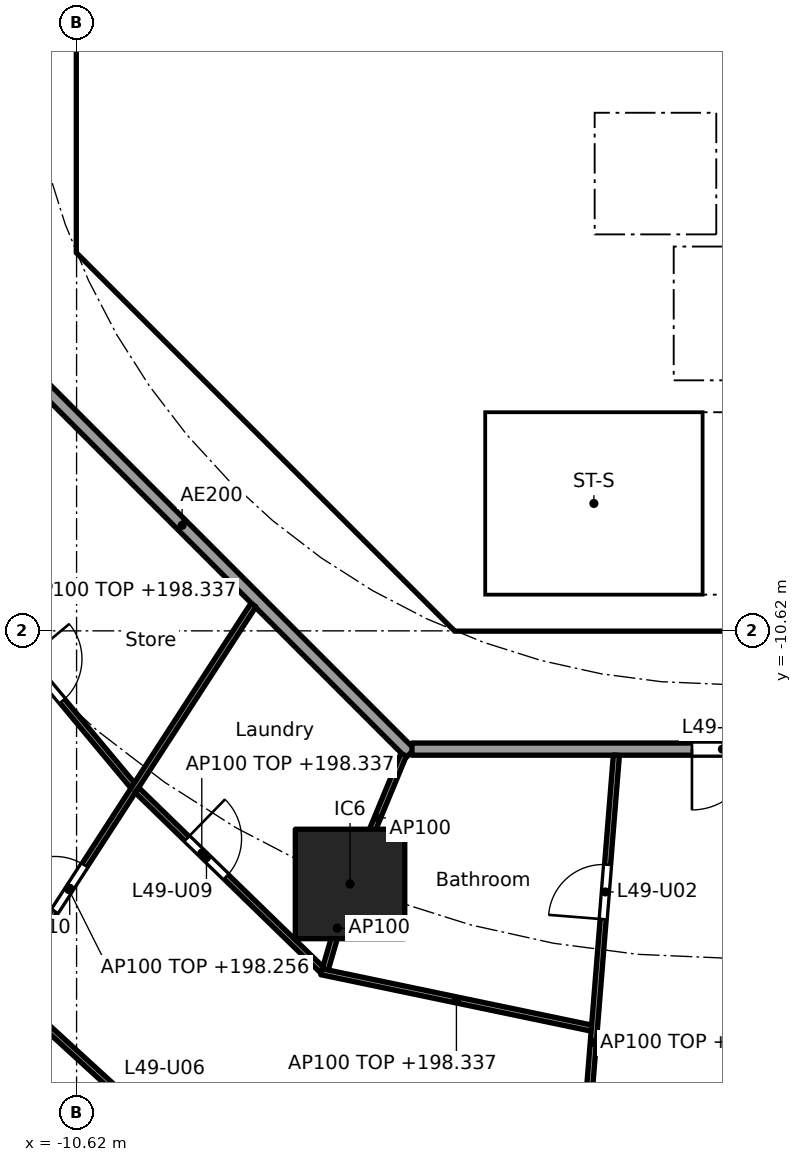
"""IFC4 building model, lengths in metres.
Left out: names, types, materials, properties, quantities, classifications, styles, units other than length and angle.
Written with IfcOpenShell. Run it as: python <this file> out.ifc"""

import sys

from ifc_helpers import new_model, si_unit, direction, frame, frame_2d, origin, origin_2d, place, context, subcontext, project, spatial, polyline, rectangle, outline, extrude, element, fill, save


model = new_model("IFC4")
c1 = context("Model", 3, precision=1e-05, world=origin(), true_north=direction((0.0, 1.0)))
c2 = subcontext(c1, "Body", "Model", "MODEL_VIEW")
j1 = project(units=[si_unit("LENGTHUNIT", "METRE"), si_unit("PLANEANGLEUNIT", "RADIAN")], contexts=[c1])
p1 = place(None, origin())
s1 = spatial("IfcSite", under=j1, at=p1, CompositionType="ELEMENT")
p2 = place(p1, origin())
s2 = spatial("IfcBuilding", under=s1, at=p2, CompositionType="ELEMENT")
p3 = place(p2, frame((0.0, 0.0, 195.5)))
s3 = spatial("IfcBuildingStorey", under=s2, at=p3, CompositionType="ELEMENT", Elevation=195.5)
p4 = place(p3, frame((-6.123, -14.782, 0.0), z_axis=(0.0, 0.0, 1.0), x_axis=(1.0, 0.0, 0.0)))
e1 = element("IfcColumn", 1, at=p4, inside=s3, PredefinedType="COLUMN", context=c2, shape_type="SweptSolid", body=[
    extrude(rectangle(XDim=1.8, YDim=1.8, at=origin_2d()), origin(), (0.0, 0.0, 1.0), 3.7),
])
p5 = place(p3, frame((-10.325, 3.801, 0.0), z_axis=(0.0, 0.0, 1.0), x_axis=(0.0, -1.0, 0.0)))
e2 = element("IfcWall", 2, at=p5, inside=s3, PredefinedType="SHEAR", context=c2, shape_type="SweptSolid", body=[
    extrude(rectangle(XDim=7.602, YDim=0.6, at=frame_2d((3.801, 0.0))), origin(), (0.0, 0.0, 1.0), 3.44),
])
p6 = place(p5, frame((0.651, 0.0, 0.0)))
e3 = element("IfcOpeningElement", 3, at=p6, cuts=e2, PredefinedType="OPENING", context=c2, shape_type="SweptSolid", body=[
    extrude(rectangle(XDim=1.5, YDim=2.1, at=frame_2d((0.75, 1.05))), frame((0.0, 0.31, 0.0), z_axis=(0.0, -1.0, 0.0), x_axis=(1.0, 0.0, 0.0)), (0.0, 0.0, 1.0), 0.62),
])
p7 = place(p5, frame((5.451, 0.0, 0.0)))
e4 = element("IfcOpeningElement", 4, at=p7, cuts=e2, PredefinedType="OPENING", context=c2, shape_type="SweptSolid", body=[
    extrude(rectangle(XDim=1.5, YDim=2.1, at=frame_2d((0.75, 1.05))), frame((0.0, 0.31, 0.0), z_axis=(0.0, -1.0, 0.0), x_axis=(1.0, 0.0, 0.0)), (0.0, 0.0, 1.0), 0.62),
])
p8 = place(p3, frame((-9.988, -4.613, 0.0), z_axis=(0.0, 0.0, 1.0), x_axis=(0.707106781187, -0.707106781187, 0.0)))
e5 = element("IfcWall", 5, at=p8, inside=s3, PredefinedType="SHEAR", context=c2, shape_type="SweptSolid", body=[
    extrude(rectangle(XDim=7.602, YDim=0.6, at=frame_2d((3.801, 0.0))), origin(), (0.0, 0.0, 1.0), 3.44),
])
p9 = place(p8, frame((6.151, 0.0, 0.0)))
e6 = element("IfcOpeningElement", 6, at=p9, cuts=e5, PredefinedType="OPENING", context=c2, shape_type="SweptSolid", body=[
    extrude(rectangle(XDim=1.1, YDim=2.1, at=frame_2d((0.55, 1.05))), frame((0.0, 0.31, 0.0), z_axis=(0.0, -1.0, 0.0), x_axis=(1.0, 0.0, 0.0)), (0.0, 0.0, 1.0), 0.62),
])
p10 = place(p3, frame((-6.2, -7.827, 0.0), z_axis=(0.0, 0.0, 1.0), x_axis=(0.0, 1.0, 0.0)))
e7 = element("IfcWall", 7, at=p10, inside=s3, PredefinedType="PARTITIONING", context=c2, shape_type="SweptSolid", body=[
    extrude(rectangle(XDim=3.527, YDim=0.15, at=frame_2d((1.763, 0.0))), origin(), (0.0, 0.0, 1.0), 3.44),
])
p11 = place(p10, frame((2.365, 0.0, 0.0)))
e8 = element("IfcOpeningElement", 8, at=p11, cuts=e7, PredefinedType="OPENING", context=c2, shape_type="SweptSolid", body=[
    extrude(rectangle(XDim=0.9, YDim=2.1, at=frame_2d((0.45, 1.05))), frame((0.0, 0.085, 0.0), z_axis=(0.0, -1.0, 0.0), x_axis=(1.0, 0.0, 0.0)), (0.0, 0.0, 1.0), 0.17),
])
p12 = place(p10, frame((0.489, 0.0, 0.0)))
e9 = element("IfcOpeningElement", 9, at=p12, cuts=e7, PredefinedType="OPENING", context=c2, shape_type="SweptSolid", body=[
    extrude(rectangle(XDim=0.9, YDim=2.1, at=frame_2d((0.45, 1.05))), frame((0.0, 0.085, 0.0), z_axis=(0.0, -1.0, 0.0), x_axis=(1.0, 0.0, 0.0)), (0.0, 0.0, 1.0), 0.17),
])
p13 = place(p3, frame((-4.0, -6.5, 0.0), z_axis=(0.0, 0.0, 1.0), x_axis=(0.0, 1.0, 0.0)))
e10 = element("IfcWall", 10, at=p13, inside=s3, PredefinedType="SOLIDWALL", context=c2, shape_type="SweptSolid", body=[
    extrude(rectangle(XDim=2.2, YDim=0.2, at=frame_2d((1.1, 0.0))), origin(), (0.0, 0.0, 1.0), 3.44),
])
p14 = place(p13, frame((0.65, 0.0, 0.0)))
e11 = element("IfcOpeningElement", 11, at=p14, cuts=e10, PredefinedType="OPENING", context=c2, shape_type="SweptSolid", body=[
    extrude(rectangle(XDim=0.9, YDim=2.1, at=frame_2d((0.45, 1.05))), frame((0.0, 0.11, 0.0), z_axis=(0.0, -1.0, 0.0), x_axis=(1.0, 0.0, 0.0)), (0.0, 0.0, 1.0), 0.22),
])
p15 = place(p3, frame((-6.7, -2.0, 0.0), z_axis=(0.0, 0.0, 1.0), x_axis=(1.0, 0.0, 0.0)))
e12 = element("IfcWall", 12, at=p15, inside=s3, PredefinedType="SOLIDWALL", context=c2, shape_type="SweptSolid", body=[
    extrude(rectangle(XDim=13.4, YDim=0.2, at=frame_2d((6.7, 0.0))), origin(), (0.0, 0.0, 1.0), 3.44),
])
p16 = place(p15, frame((5.05, 0.0, 0.0)))
e13 = element("IfcOpeningElement", 13, at=p16, cuts=e12, PredefinedType="OPENING", context=c2, shape_type="SweptSolid", body=[
    extrude(rectangle(XDim=1.1, YDim=2.1, at=frame_2d((0.55, 1.05))), frame((0.0, 0.11, 0.0), z_axis=(0.0, -1.0, 0.0), x_axis=(1.0, 0.0, 0.0)), (0.0, 0.0, 1.0), 0.22),
])
p17 = place(p15, frame((7.25, 0.0, 0.0)))
e14 = element("IfcOpeningElement", 14, at=p17, cuts=e12, PredefinedType="OPENING", context=c2, shape_type="SweptSolid", body=[
    extrude(rectangle(XDim=1.1, YDim=2.1, at=frame_2d((0.55, 1.05))), frame((0.0, 0.11, 0.0), z_axis=(0.0, -1.0, 0.0), x_axis=(1.0, 0.0, 0.0)), (0.0, 0.0, 1.0), 0.22),
])
p18 = place(p15, frame((0.75, 0.0, 0.0)))
e15 = element("IfcOpeningElement", 15, at=p18, cuts=e12, PredefinedType="OPENING", context=c2, shape_type="SweptSolid", body=[
    extrude(rectangle(XDim=0.9, YDim=2.1, at=frame_2d((0.45, 1.05))), frame((0.0, 0.11, 0.0), z_axis=(0.0, -1.0, 0.0), x_axis=(1.0, 0.0, 0.0)), (0.0, 0.0, 1.0), 0.22),
])
p19 = place(p15, frame((2.95, 0.0, 0.0)))
e16 = element("IfcOpeningElement", 16, at=p19, cuts=e12, PredefinedType="OPENING", context=c2, shape_type="SweptSolid", body=[
    extrude(rectangle(XDim=0.9, YDim=2.1, at=frame_2d((0.45, 1.05))), frame((0.0, 0.11, 0.0), z_axis=(0.0, -1.0, 0.0), x_axis=(1.0, 0.0, 0.0)), (0.0, 0.0, 1.0), 0.22),
])
p20 = place(p3, origin())
e17 = element("IfcWall", 17, at=p20, inside=s3, PredefinedType="SHEAR", context=c2, shape_type="SweptSolid", body=[
    extrude(outline(polyline([(-10.625, -3.801), (-10.025, -3.801), (-10.025, -4.152), (-9.776, -4.401), (-10.2, -4.825), (-10.625, -4.401), (-10.625, -3.801)])), origin(), (0.0, 0.0, 1.0), 3.44),
])
p21 = place(p3, origin())
e18 = element("IfcWall", 18, at=p21, inside=s3, PredefinedType="SHEAR", context=c2, shape_type="SweptSolid", body=[
    extrude(outline(polyline([(-4.152, -10.025), (4.152, -10.025), (4.401, -9.776), (4.825, -10.2), (4.401, -10.625), (-4.401, -10.625), (-4.825, -10.2), (-4.401, -9.776), (-4.152, -10.025)])), origin(), (0.0, 0.0, 1.0), 3.44),
])
p22 = place(p3, frame((-0.9, -6.5, 0.0), z_axis=(0.0, 0.0, 1.0), x_axis=(0.0, 1.0, 0.0)))
e19 = element("IfcWall", 19, at=p22, inside=s3, PredefinedType="SOLIDWALL", context=c2, shape_type="SweptSolid", body=[
    extrude(rectangle(XDim=2.2, YDim=0.2, at=frame_2d((1.1, 0.0))), origin(), (0.0, 0.0, 1.0), 3.44),
])
p23 = place(p3, origin())
e20 = element("IfcWall", 20, at=p23, inside=s3, PredefinedType="SOLIDWALL", context=c2, shape_type="SweptSolid", body=[
    extrude(outline(polyline([(-6.7, -2.1), (-6.5, -2.1), (-6.5, -4.1), (-4.5, -4.1), (-4.5, -2.1), (-4.3, -2.1), (-4.3, -4.1), (-2.3, -4.1), (-2.3, -2.1), (-2.1, -2.1), (-2.1, -4.1), (-0.1, -4.1), (-0.1, -2.1), (0.1, -2.1), (0.1, -4.1), (2.1, -4.1), (2.1, -2.1), (2.3, -2.1), (2.3, -4.1), (4.3, -4.1), (4.3, -2.1), (4.5, -2.1), (4.5, -4.1), (6.5, -4.1), (6.5, -2.1), (6.7, -2.1), (6.7, -4.3), (-6.7, -4.3), (-6.7, -2.1)])), origin(), (0.0, 0.0, 1.0), 3.44),
])
p24 = place(p3, frame((-10.025, -4.0, 0.0), z_axis=(0.0, 0.0, 1.0), x_axis=(1.0, 0.0, 0.0)))
e21 = element("IfcWall", 21, at=p24, inside=s3, PredefinedType="PARTITIONING", context=c2, shape_type="SweptSolid", body=[
    extrude(rectangle(XDim=3.325, YDim=0.2, at=frame_2d((1.662, 0.0))), origin(), (0.0, 0.0, 1.0), 3.44),
])
p25 = place(p3, frame((-8.301, -5.8, 0.0), z_axis=(0.0, 0.0, 1.0), x_axis=(1.0, 0.0, 0.0)))
e22 = element("IfcWall", 22, at=p25, inside=s3, PredefinedType="PARTITIONING", context=c2, shape_type="SweptSolid", body=[
    extrude(rectangle(XDim=2.026, YDim=0.15, at=frame_2d((1.013, 0.0))), origin(), (0.0, 0.0, 1.0), 3.44),
])
p26 = place(p3, origin())
e23 = element("IfcWall", 23, at=p26, inside=s3, PredefinedType="SOLIDWALL", context=c2, shape_type="SweptSolid", body=[
    extrude(outline(polyline([(-3.9, -10.025), (-4.1, -10.025), (-4.1, -7.025), (-3.9, -7.025), (-3.9, -10.025)])), origin(), (0.0, 0.0, 1.0), 3.44),
])
p27 = place(p3, origin())
e24 = element("IfcWall", 24, at=p27, inside=s3, PredefinedType="SOLIDWALL", context=c2, shape_type="SweptSolid", body=[
    extrude(outline(polyline([(4.1, -7.025), (-4.1, -7.025), (-4.1, -6.5), (4.1, -6.5), (4.1, -7.025)])), origin(), (0.0, 0.0, 1.0), 3.44),
])
p28 = place(p3, frame((-12.635, -5.134, 0.0), z_axis=(0.0, 0.0, 1.0), x_axis=(0.707106781187, -0.707106781187, 0.0)))
e25 = element("IfcWall", 25, at=p28, inside=s3, PredefinedType="PARTITIONING", context=c2, shape_type="SweptSolid", body=[
    extrude(rectangle(XDim=10.609, YDim=0.2, at=frame_2d((5.305, 0.0))), origin(), (0.0, 0.0, 1.0), 3.44),
])
p29 = place(p3, frame((-5.104, -12.565, 0.0), z_axis=(0.0, 0.0, 1.0), x_axis=(1.0, 0.0, 0.0)))
e26 = element("IfcWall", 26, at=p29, inside=s3, PredefinedType="PARTITIONING", context=c2, shape_type="SweptSolid", body=[
    extrude(rectangle(XDim=10.409, YDim=0.2, at=frame_2d((5.205, 0.0))), origin(), (0.0, 0.0, 1.0), 3.44),
])
p30 = place(p29, frame((4.604, 0.0, 0.0)))
e27 = element("IfcOpeningElement", 27, at=p30, cuts=e26, PredefinedType="OPENING", context=c2, shape_type="SweptSolid", body=[
    extrude(rectangle(XDim=1.0, YDim=2.1, at=frame_2d((0.5, 1.05))), frame((0.0, 0.11, 0.0), z_axis=(0.0, -1.0, 0.0), x_axis=(1.0, 0.0, 0.0)), (0.0, 0.0, 1.0), 0.22),
])
p31 = place(p3, frame((-12.623, -9.653, 0.0), z_axis=(0.0, 0.0, 1.0), x_axis=(0.640315711982, -0.768111833647, 0.0)))
e28 = element("IfcWall", 28, at=p31, inside=s3, PredefinedType="PARTITIONING", context=c2, shape_type="SweptSolid", body=[
    extrude(rectangle(XDim=4.572, YDim=0.1, at=frame_2d((2.286, 0.0))), origin(), (0.0, 0.0, 1.0), 2.837),
])
p32 = place(p31, frame((1.861, 0.0, 0.0)))
e29 = element("IfcOpeningElement", 29, at=p32, cuts=e28, PredefinedType="OPENING", context=c2, shape_type="SweptSolid", body=[
    extrude(rectangle(XDim=0.9, YDim=2.1, at=frame_2d((0.45, 1.05))), frame((0.0, 0.06, 0.0), z_axis=(0.0, -1.0, 0.0), x_axis=(1.0, 0.0, 0.0)), (0.0, 0.0, 1.0), 0.12),
])
p33 = place(p3, frame((-7.712, -10.195, 0.0), z_axis=(0.0, 0.0, 1.0), x_axis=(-0.544176533609, -0.838970738625, 0.0)))
e30 = element("IfcWall", 30, at=p33, inside=s3, PredefinedType="PARTITIONING", context=c2, shape_type="SweptSolid", body=[
    extrude(rectangle(XDim=11.156, YDim=0.1, at=frame_2d((5.578, 0.0))), origin(), (0.0, 0.0, 1.0), 2.756),
])
p34 = place(p33, frame((5.101, 0.0, 0.0)))
e31 = element("IfcOpeningElement", 31, at=p34, cuts=e30, PredefinedType="OPENING", context=c2, shape_type="SweptSolid", body=[
    extrude(rectangle(XDim=0.9, YDim=2.1, at=frame_2d((0.45, 1.05))), frame((0.0, 0.06, 0.0), z_axis=(0.0, -1.0, 0.0), x_axis=(1.0, 0.0, 0.0)), (0.0, 0.0, 1.0), 0.12),
])
p35 = place(p3, frame((-9.627, -13.238, 0.0), z_axis=(0.0, 0.0, 1.0), x_axis=(0.716946269374, -0.697128429223, 0.0)))
e32 = element("IfcWall", 32, at=p35, inside=s3, PredefinedType="PARTITIONING", context=c2, shape_type="SweptSolid", body=[
    extrude(rectangle(XDim=4.25, YDim=0.1, at=frame_2d((2.125, 0.0))), origin(), (0.0, 0.0, 1.0), 2.837),
])
p36 = place(p35, frame((1.145, 0.0, 0.0)))
e33 = element("IfcOpeningElement", 33, at=p36, cuts=e32, PredefinedType="OPENING", context=c2, shape_type="SweptSolid", body=[
    extrude(rectangle(XDim=0.9, YDim=2.1, at=frame_2d((0.45, 1.05))), frame((0.0, 0.06, 0.0), z_axis=(0.0, -1.0, 0.0), x_axis=(1.0, 0.0, 0.0)), (0.0, 0.0, 1.0), 0.12),
])
p37 = place(p3, frame((-11.766, -16.535, 0.0), z_axis=(0.0, 0.0, 1.0), x_axis=(0.738053852169, -0.674741810842, 0.0)))
e34 = element("IfcWall", 34, at=p37, inside=s3, PredefinedType="PARTITIONING", context=c2, shape_type="SweptSolid", body=[
    extrude(rectangle(XDim=5.549, YDim=0.1, at=frame_2d((2.774, 0.0))), origin(), (0.0, 0.0, 1.0), 2.837),
])
p38 = place(p37, frame((2.3, 0.0, 0.0)))
e35 = element("IfcOpeningElement", 35, at=p38, cuts=e34, PredefinedType="OPENING", context=c2, shape_type="SweptSolid", body=[
    extrude(rectangle(XDim=0.9, YDim=2.1, at=frame_2d((0.45, 1.05))), frame((0.0, 0.06, 0.0), z_axis=(0.0, -1.0, 0.0), x_axis=(1.0, 0.0, 0.0)), (0.0, 0.0, 1.0), 0.12),
])
p39 = place(p3, frame((-5.243, -12.657, 0.0), z_axis=(0.0, 0.0, 1.0), x_axis=(-0.382719158442, -0.923864733477, 0.0)))
e36 = element("IfcWall", 36, at=p39, inside=s3, PredefinedType="PARTITIONING", context=c2, shape_type="SweptSolid", body=[
    extrude(rectangle(XDim=2.25, YDim=0.1, at=frame_2d((1.125, 0.0))), origin(), (0.0, 0.0, 1.0), 3.44),
])
p40 = place(p3, frame((-6.137, -14.831, 0.0), z_axis=(0.0, 0.0, 1.0), x_axis=(-0.2785069197, -0.960434222464, 0.0)))
e37 = element("IfcWall", 37, at=p40, inside=s3, PredefinedType="PARTITIONING", context=c2, shape_type="SweptSolid", body=[
    extrude(rectangle(XDim=1.413, YDim=0.1, at=frame_2d((0.707, 0.0))), origin(), (0.0, 0.0, 1.0), 3.44),
])
p41 = place(p3, frame((-6.594, -16.226, 0.0), z_axis=(0.0, 0.0, 1.0), x_axis=(0.978902428641, -0.204328253553, 0.0)))
e38 = element("IfcWall", 38, at=p41, inside=s3, PredefinedType="PARTITIONING", context=c2, shape_type="SweptSolid", body=[
    extrude(rectangle(XDim=4.536, YDim=0.1, at=frame_2d((2.268, 0.0))), origin(), (0.0, 0.0, 1.0), 2.837),
])
p42 = place(p3, frame((-1.743, -12.665, 0.0), z_axis=(0.0, 0.0, 1.0), x_axis=(-0.080170892619, -0.996781133437, 0.0)))
e39 = element("IfcWall", 39, at=p42, inside=s3, PredefinedType="PARTITIONING", context=c2, shape_type="SweptSolid", body=[
    extrude(rectangle(XDim=9.483, YDim=0.1, at=frame_2d((4.741, 0.0))), origin(), (0.0, 0.0, 1.0), 2.756),
])
p43 = place(p42, frame((1.806, 0.0, 0.0)))
e40 = element("IfcOpeningElement", 40, at=p43, cuts=e39, PredefinedType="OPENING", context=c2, shape_type="SweptSolid", body=[
    extrude(rectangle(XDim=0.9, YDim=2.1, at=frame_2d((0.45, 1.05))), frame((0.0, 0.06, 0.0), z_axis=(0.0, -1.0, 0.0), x_axis=(1.0, 0.0, 0.0)), (0.0, 0.0, 1.0), 0.12),
])
p44 = place(p42, frame((6.523, 0.0, 0.0)))
e41 = element("IfcOpeningElement", 41, at=p44, cuts=e39, PredefinedType="OPENING", context=c2, shape_type="SweptSolid", body=[
    extrude(rectangle(XDim=0.9, YDim=2.1, at=frame_2d((0.45, 1.05))), frame((0.0, 0.06, 0.0), z_axis=(0.0, -1.0, 0.0), x_axis=(1.0, 0.0, 0.0)), (0.0, 0.0, 1.0), 0.12),
])
p45 = place(p16, origin())
e42 = element("IfcDoor", 42, at=p45, inside=s3, OperationType="DOUBLE_DOOR_SLIDING", PredefinedType="DOOR", context=c2, shape_type="SweptSolid", body=[
    extrude(rectangle(XDim=1.1, YDim=2.1, at=frame_2d((0.55, 1.05))), frame((0.0, 0.025, 0.0), z_axis=(0.0, -1.0, 0.0), x_axis=(1.0, 0.0, 0.0)), (0.0, 0.0, 1.0), 0.05),
])
fill(e13, e42)
p46 = place(p11, origin())
e43 = element("IfcDoor", 43, at=p46, inside=s3, OperationType="SINGLE_SWING_LEFT", PredefinedType="DOOR", context=c2, shape_type="SweptSolid", body=[
    extrude(rectangle(XDim=0.9, YDim=2.1, at=frame_2d((0.45, 1.05))), frame((0.0, 0.025, 0.0), z_axis=(0.0, -1.0, 0.0), x_axis=(1.0, 0.0, 0.0)), (0.0, 0.0, 1.0), 0.05),
])
fill(e8, e43)
p47 = place(p12, origin())
e44 = element("IfcDoor", 44, at=p47, inside=s3, OperationType="SINGLE_SWING_LEFT", PredefinedType="DOOR", context=c2, shape_type="SweptSolid", body=[
    extrude(rectangle(XDim=0.9, YDim=2.1, at=frame_2d((0.45, 1.05))), frame((0.0, 0.025, 0.0), z_axis=(0.0, -1.0, 0.0), x_axis=(1.0, 0.0, 0.0)), (0.0, 0.0, 1.0), 0.05),
])
fill(e9, e44)
p48 = place(p14, frame((0.9, 0.0, 0.0), x_axis=(-1.0, 0.0, 0.0)))
e45 = element("IfcDoor", 45, at=p48, inside=s3, OperationType="SINGLE_SWING_RIGHT", PredefinedType="DOOR", context=c2, shape_type="SweptSolid", body=[
    extrude(rectangle(XDim=0.9, YDim=2.1, at=frame_2d((0.45, 1.05))), frame((0.0, 0.025, 0.0), z_axis=(0.0, -1.0, 0.0), x_axis=(1.0, 0.0, 0.0)), (0.0, 0.0, 1.0), 0.05),
])
fill(e11, e45)
p49 = place(p18, frame((0.9, 0.0, 0.0), x_axis=(-1.0, 0.0, 0.0)))
e46 = element("IfcDoor", 46, at=p49, inside=s3, OperationType="SINGLE_SWING_LEFT", PredefinedType="DOOR", context=c2, shape_type="SweptSolid", body=[
    extrude(rectangle(XDim=0.9, YDim=2.1, at=frame_2d((0.45, 1.05))), frame((0.0, 0.025, 0.0), z_axis=(0.0, -1.0, 0.0), x_axis=(1.0, 0.0, 0.0)), (0.0, 0.0, 1.0), 0.05),
])
fill(e15, e46)
p50 = place(p19, frame((0.9, 0.0, 0.0), x_axis=(-1.0, 0.0, 0.0)))
e47 = element("IfcDoor", 47, at=p50, inside=s3, OperationType="SINGLE_SWING_LEFT", PredefinedType="DOOR", context=c2, shape_type="SweptSolid", body=[
    extrude(rectangle(XDim=0.9, YDim=2.1, at=frame_2d((0.45, 1.05))), frame((0.0, 0.025, 0.0), z_axis=(0.0, -1.0, 0.0), x_axis=(1.0, 0.0, 0.0)), (0.0, 0.0, 1.0), 0.05),
])
fill(e16, e47)
p51 = place(p7, origin())
e48 = element("IfcDoor", 48, at=p51, inside=s3, OperationType="DOUBLE_DOOR_SINGLE_SWING", PredefinedType="DOOR", context=c2, shape_type="SweptSolid", body=[
    extrude(rectangle(XDim=1.5, YDim=2.1, at=frame_2d((0.75, 1.05))), frame((0.0, 0.025, 0.0), z_axis=(0.0, -1.0, 0.0), x_axis=(1.0, 0.0, 0.0)), (0.0, 0.0, 1.0), 0.05),
])
fill(e4, e48)
p52 = place(p9, origin())
e49 = element("IfcDoor", 49, at=p52, inside=s3, OperationType="SINGLE_SWING_RIGHT", PredefinedType="DOOR", context=c2, shape_type="SweptSolid", body=[
    extrude(rectangle(XDim=1.1, YDim=2.1, at=frame_2d((0.55, 1.05))), frame((0.0, 0.025, 0.0), z_axis=(0.0, -1.0, 0.0), x_axis=(1.0, 0.0, 0.0)), (0.0, 0.0, 1.0), 0.05),
])
fill(e6, e49)
p53 = place(p30, frame((1.0, 0.0, 0.0), x_axis=(-1.0, 0.0, 0.0)))
e50 = element("IfcDoor", 50, at=p53, inside=s3, OperationType="SINGLE_SWING_RIGHT", PredefinedType="DOOR", context=c2, shape_type="SweptSolid", body=[
    extrude(rectangle(XDim=1.0, YDim=2.1, at=frame_2d((0.5, 1.05))), frame((0.0, 0.025, 0.0), z_axis=(0.0, -1.0, 0.0), x_axis=(1.0, 0.0, 0.0)), (0.0, 0.0, 1.0), 0.05),
])
fill(e27, e50)
p54 = place(p43, frame((0.9, 0.0, 0.0), x_axis=(-1.0, 0.0, 0.0)))
e51 = element("IfcDoor", 51, at=p54, inside=s3, OperationType="SINGLE_SWING_LEFT", PredefinedType="DOOR", context=c2, shape_type="SweptSolid", body=[
    extrude(rectangle(XDim=0.9, YDim=2.1, at=frame_2d((0.45, 1.05))), frame((0.0, 0.025, 0.0), z_axis=(0.0, -1.0, 0.0), x_axis=(1.0, 0.0, 0.0)), (0.0, 0.0, 1.0), 0.05),
])
fill(e40, e51)
p55 = place(p36, origin())
e52 = element("IfcDoor", 52, at=p55, inside=s3, OperationType="SINGLE_SWING_LEFT", PredefinedType="DOOR", context=c2, shape_type="SweptSolid", body=[
    extrude(rectangle(XDim=0.9, YDim=2.1, at=frame_2d((0.45, 1.05))), frame((0.0, 0.025, 0.0), z_axis=(0.0, -1.0, 0.0), x_axis=(1.0, 0.0, 0.0)), (0.0, 0.0, 1.0), 0.05),
])
fill(e33, e52)
p56 = place(p34, frame((0.9, 0.0, 0.0), x_axis=(-1.0, 0.0, 0.0)))
e53 = element("IfcDoor", 53, at=p56, inside=s3, OperationType="SINGLE_SWING_LEFT", PredefinedType="DOOR", context=c2, shape_type="SweptSolid", body=[
    extrude(rectangle(XDim=0.9, YDim=2.1, at=frame_2d((0.45, 1.05))), frame((0.0, 0.025, 0.0), z_axis=(0.0, -1.0, 0.0), x_axis=(1.0, 0.0, 0.0)), (0.0, 0.0, 1.0), 0.05),
])
fill(e31, e53)
p57 = place(p32, origin())
e54 = element("IfcDoor", 54, at=p57, inside=s3, OperationType="SINGLE_SWING_LEFT", PredefinedType="DOOR", context=c2, shape_type="SweptSolid", body=[
    extrude(rectangle(XDim=0.9, YDim=2.1, at=frame_2d((0.45, 1.05))), frame((0.0, 0.025, 0.0), z_axis=(0.0, -1.0, 0.0), x_axis=(1.0, 0.0, 0.0)), (0.0, 0.0, 1.0), 0.05),
])
fill(e29, e54)
save(model, sys.argv[1])
